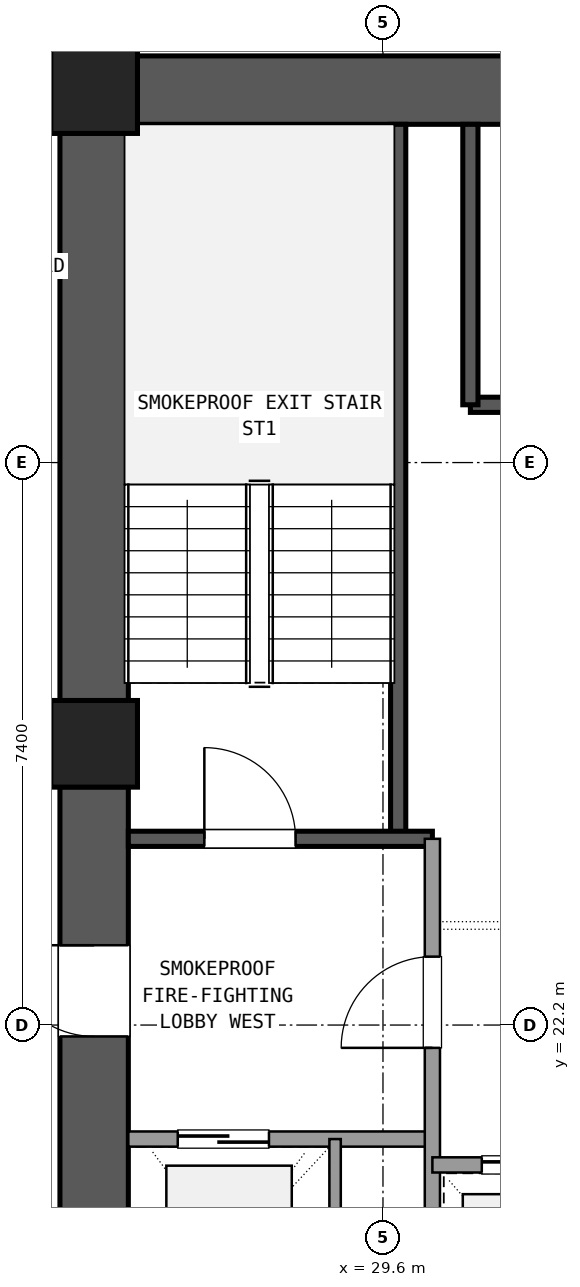
"""IFC4 building model, lengths in metres.
Left out: names, types, materials, properties, quantities, classifications, styles, units other than length and angle.
Written with IfcOpenShell. Run it as: python <this file> out.ifc"""

import sys

from ifc_helpers import new_model, si_unit, direction, frame, frame_2d, origin, origin_2d, place, context, subcontext, project, spatial, rectangle, extrude, element, fill, save


model = new_model("IFC4")
c1 = context("Model", 3, precision=1e-05, world=origin(), true_north=direction((0.0, 1.0)))
c2 = subcontext(c1, "Body", "Model", "MODEL_VIEW")
j1 = project(units=[si_unit("LENGTHUNIT", "METRE"), si_unit("PLANEANGLEUNIT", "RADIAN")], contexts=[c1])
p1 = place(None, origin())
s1 = spatial("IfcSite", under=j1, at=p1, CompositionType="ELEMENT")
p2 = place(p1, origin())
s2 = spatial("IfcBuilding", under=s1, at=p2, CompositionType="ELEMENT")
p3 = place(p2, frame((0.0, 0.0, 41.94)))
s3 = spatial("IfcBuildingStorey", under=s2, at=p3, CompositionType="ELEMENT", Elevation=41.94)
for number, where, z_axis, x_axis in (
    (1, (25.8, 34.5, 0.0), (0.0, 0.0, 1.0), (1.0, 0.0, 0.0)),
    (2, (25.8, 25.9, 0.0), (0.0, 0.0, 1.0), (1.0, 0.0, 0.0)),
):
    element("IfcColumn", number, at=place(p3, frame(where, z_axis=z_axis, x_axis=x_axis)), inside=s3, PredefinedType="COLUMN", context=c2, shape_type="SweptSolid", body=[
        extrude(rectangle(XDim=1.14, YDim=1.14, at=origin_2d()), origin(), (0.0, 0.0, 1.0), 3.6),
    ])
p4 = place(p3, frame((36.435, 34.5, 0.0), z_axis=(0.0, 0.0, 1.0), x_axis=(-1.0, 0.0, 0.0)))
e3 = element("IfcWall", 3, at=p4, inside=s3, PredefinedType="SHEAR", context=c2, shape_type="SweptSolid", body=[
    extrude(rectangle(XDim=10.07, YDim=0.9, at=frame_2d((5.035, 0.0))), origin(), (0.0, 0.0, 1.0), 3.32),
])
p5 = place(p4, frame((4.035, 0.0, 0.0)))
e4 = element("IfcOpeningElement", 4, at=p5, cuts=e3, PredefinedType="OPENING", context=c2, shape_type="SweptSolid", body=[
    extrude(rectangle(XDim=1.2, YDim=2.15, at=frame_2d((0.6, 1.075))), frame((0.0, 0.46, 0.0), z_axis=(0.0, -1.0, 0.0), x_axis=(1.0, 0.0, 0.0)), (0.0, 0.0, 1.0), 0.92),
])
p6 = place(p3, frame((25.8, 33.935, 0.0), z_axis=(0.0, 0.0, 1.0), x_axis=(0.0, -1.0, 0.0)))
e5 = element("IfcWall", 5, at=p6, inside=s3, PredefinedType="SHEAR", context=c2, shape_type="SweptSolid", body=[
    extrude(rectangle(XDim=7.47, YDim=0.9, at=frame_2d((3.735, 0.0))), origin(), (0.0, 0.0, 1.0), 3.32),
])
p7 = place(p3, frame((25.8, 25.335, 0.0), z_axis=(0.0, 0.0, 1.0), x_axis=(0.0, -1.0, 0.0)))
e6 = element("IfcWall", 6, at=p7, inside=s3, PredefinedType="SHEAR", context=c2, shape_type="SweptSolid", body=[
    extrude(rectangle(XDim=7.47, YDim=0.9, at=frame_2d((3.735, 0.0))), origin(), (0.0, 0.0, 1.0), 3.32),
])
p8 = place(p7, frame((2.085, 0.0, 0.0)))
e7 = element("IfcOpeningElement", 7, at=p8, cuts=e6, PredefinedType="OPENING", context=c2, shape_type="SweptSolid", body=[
    extrude(rectangle(XDim=1.2, YDim=2.15, at=frame_2d((0.6, 1.075))), frame((0.0, 0.46, 0.0), z_axis=(0.0, -1.0, 0.0), x_axis=(1.0, 0.0, 0.0)), (0.0, 0.0, 1.0), 0.92),
])
p9 = place(p3, frame((29.8, 24.65, 0.0), z_axis=(0.0, 0.0, 1.0), x_axis=(0.0, 1.0, 0.0)))
e8 = element("IfcWall", 8, at=p9, inside=s3, PredefinedType="SHEAR", context=c2, shape_type="SweptSolid", body=[
    extrude(rectangle(XDim=9.4, YDim=0.2, at=frame_2d((4.7, 0.0))), origin(), (0.0, 0.0, 1.0), 3.32),
])
p10 = place(p3, frame((26.25, 24.65, 0.0), z_axis=(0.0, 0.0, 1.0), x_axis=(1.0, 0.0, 0.0)))
e9 = element("IfcWall", 9, at=p10, inside=s3, PredefinedType="SHEAR", context=c2, shape_type="SweptSolid", body=[
    extrude(rectangle(XDim=4.0, YDim=0.2, at=frame_2d((2.0, 0.0))), origin(), (0.0, 0.0, 1.0), 3.32),
])
p11 = place(p10, frame((1.0, 0.0, 0.0)))
e10 = element("IfcOpeningElement", 10, at=p11, cuts=e9, PredefinedType="OPENING", context=c2, shape_type="SweptSolid", body=[
    extrude(rectangle(XDim=1.2, YDim=2.15, at=frame_2d((0.6, 1.075))), frame((0.0, 0.11, 0.0), z_axis=(0.0, -1.0, 0.0), x_axis=(1.0, 0.0, 0.0)), (0.0, 0.0, 1.0), 0.22),
])
p12 = place(p3, frame((30.75, 30.36, 0.0), z_axis=(0.0, 0.0, 1.0), x_axis=(1.0, 0.0, 0.0)))
e11 = element("IfcWall", 11, at=p12, inside=s3, PredefinedType="SHEAR", context=c2, shape_type="SweptSolid", body=[
    extrude(rectangle(XDim=9.5, YDim=0.2, at=frame_2d((4.75, 0.0))), origin(), (0.0, 0.0, 1.0), 3.32),
])
p13 = place(p3, frame((30.75, 30.36, 0.0), z_axis=(0.0, 0.0, 1.0), x_axis=(0.0, 1.0, 0.0)))
e12 = element("IfcWall", 12, at=p13, inside=s3, PredefinedType="SHEAR", context=c2, shape_type="SweptSolid", body=[
    extrude(rectangle(XDim=3.69, YDim=0.2, at=frame_2d((1.845, 0.0))), origin(), (0.0, 0.0, 1.0), 3.32),
])
p14 = place(p3, frame((26.25, 20.7, 0.0), z_axis=(0.0, 0.0, 1.0), x_axis=(1.0, 0.0, 0.0)))
e13 = element("IfcWall", 13, at=p14, inside=s3, PredefinedType="SOLIDWALL", context=c2, shape_type="SweptSolid", body=[
    extrude(rectangle(XDim=4.0, YDim=0.2, at=frame_2d((2.0, 0.0))), origin(), (0.0, 0.0, 1.0), 2.61),
])
p15 = place(p14, frame((0.65, 0.0, 0.0)))
e14 = element("IfcOpeningElement", 14, at=p15, cuts=e13, PredefinedType="OPENING", context=c2, shape_type="SweptSolid", body=[
    extrude(rectangle(XDim=1.2, YDim=2.15, at=frame_2d((0.6, 1.075))), frame((0.0, 0.11, 0.0), z_axis=(0.0, -1.0, 0.0), x_axis=(1.0, 0.0, 0.0)), (0.0, 0.0, 1.0), 0.22),
])
p16 = place(p3, frame((30.25, 17.75, 0.0), z_axis=(0.0, 0.0, 1.0), x_axis=(0.0, 1.0, 0.0)))
e15 = element("IfcWall", 15, at=p16, inside=s3, PredefinedType="SOLIDWALL", context=c2, shape_type="SweptSolid", body=[
    extrude(rectangle(XDim=6.9, YDim=0.2, at=frame_2d((3.45, 0.0))), origin(), (0.0, 0.0, 1.0), 2.61),
])
p17 = place(p16, frame((4.15, 0.0, 0.0)))
e16 = element("IfcOpeningElement", 16, at=p17, cuts=e15, PredefinedType="OPENING", context=c2, shape_type="SweptSolid", body=[
    extrude(rectangle(XDim=1.2, YDim=2.15, at=frame_2d((0.6, 1.075))), frame((0.0, 0.11, 0.0), z_axis=(0.0, -1.0, 0.0), x_axis=(1.0, 0.0, 0.0)), (0.0, 0.0, 1.0), 0.22),
])
p18 = place(p3, frame((28.97, 17.75, 0.0), z_axis=(0.0, 0.0, 1.0), x_axis=(0.0, 1.0, 0.0)))
e17 = element("IfcWall", 17, at=p18, inside=s3, PredefinedType="PARTITIONING", context=c2, shape_type="SweptSolid", body=[
    extrude(rectangle(XDim=2.95, YDim=0.15, at=frame_2d((1.475, 0.0))), origin(), (0.0, 0.0, 1.0), 2.61),
])
p19 = place(p3, frame((30.25, 20.36, 0.0), z_axis=(0.0, 0.0, 1.0), x_axis=(1.0, 0.0, 0.0)))
e18 = element("IfcWall", 18, at=p19, inside=s3, PredefinedType="SOLIDWALL", context=c2, shape_type="SweptSolid", body=[
    extrude(rectangle(XDim=7.0, YDim=0.2, at=frame_2d((3.5, 0.0))), origin(), (0.0, 0.0, 1.0), 2.61),
])
p20 = place(p19, frame((0.65, 0.0, 0.0)))
e19 = element("IfcOpeningElement", 19, at=p20, cuts=e18, PredefinedType="OPENING", context=c2, shape_type="SweptSolid", body=[
    extrude(rectangle(XDim=1.1, YDim=2.15, at=frame_2d((0.55, 1.075))), frame((0.0, 0.11, 0.0), z_axis=(0.0, -1.0, 0.0), x_axis=(1.0, 0.0, 0.0)), (0.0, 0.0, 1.0), 0.22),
])
p21 = place(p19, frame((2.95, 0.0, 0.0)))
e20 = element("IfcOpeningElement", 20, at=p21, cuts=e18, PredefinedType="OPENING", context=c2, shape_type="SweptSolid", body=[
    extrude(rectangle(XDim=1.1, YDim=2.15, at=frame_2d((0.55, 1.075))), frame((0.0, 0.11, 0.0), z_axis=(0.0, -1.0, 0.0), x_axis=(1.0, 0.0, 0.0)), (0.0, 0.0, 1.0), 0.22),
])
p22 = place(p19, frame((5.25, 0.0, 0.0)))
e21 = element("IfcOpeningElement", 21, at=p22, cuts=e18, PredefinedType="OPENING", context=c2, shape_type="SweptSolid", body=[
    extrude(rectangle(XDim=1.1, YDim=2.15, at=frame_2d((0.55, 1.075))), frame((0.0, 0.11, 0.0), z_axis=(0.0, -1.0, 0.0), x_axis=(1.0, 0.0, 0.0)), (0.0, 0.0, 1.0), 0.22),
])
p23 = place(p11, origin())
e22 = element("IfcDoor", 22, at=p23, inside=s3, OperationType="SINGLE_SWING_LEFT", PredefinedType="DOOR", context=c2, shape_type="SweptSolid", body=[
    extrude(rectangle(XDim=1.2, YDim=2.15, at=frame_2d((0.6, 1.075))), frame((0.0, 0.025, 0.0), z_axis=(0.0, -1.0, 0.0), x_axis=(1.0, 0.0, 0.0)), (0.0, 0.0, 1.0), 0.05),
])
fill(e10, e22)
p24 = place(p15, origin())
e23 = element("IfcDoor", 23, at=p24, inside=s3, OperationType="SLIDING_TO_LEFT", PredefinedType="DOOR", context=c2, shape_type="SweptSolid", body=[
    extrude(rectangle(XDim=1.2, YDim=2.15, at=frame_2d((0.6, 1.075))), frame((0.0, 0.025, 0.0), z_axis=(0.0, -1.0, 0.0), x_axis=(1.0, 0.0, 0.0)), (0.0, 0.0, 1.0), 0.05),
])
fill(e14, e23)
p25 = place(p17, origin())
e24 = element("IfcDoor", 24, at=p25, inside=s3, OperationType="SINGLE_SWING_LEFT", PredefinedType="DOOR", context=c2, shape_type="SweptSolid", body=[
    extrude(rectangle(XDim=1.2, YDim=2.15, at=frame_2d((0.6, 1.075))), frame((0.0, 0.025, 0.0), z_axis=(0.0, -1.0, 0.0), x_axis=(1.0, 0.0, 0.0)), (0.0, 0.0, 1.0), 0.05),
])
fill(e16, e24)
p26 = place(p8, frame((1.2, 0.0, 0.0), z_axis=(0.0, 0.0, 1.0), x_axis=(-1.0, 0.0, 0.0)))
e25 = element("IfcDoor", 25, at=p26, inside=s3, OperationType="SINGLE_SWING_LEFT", PredefinedType="DOOR", context=c2, shape_type="SweptSolid", body=[
    extrude(rectangle(XDim=1.2, YDim=2.15, at=frame_2d((0.6, 1.075))), frame((0.0, 0.025, 0.0), z_axis=(0.0, -1.0, 0.0), x_axis=(1.0, 0.0, 0.0)), (0.0, 0.0, 1.0), 0.05),
])
fill(e7, e25)
p27 = place(p20, origin())
e26 = element("IfcDoor", 26, at=p27, inside=s3, OperationType="SLIDING_TO_LEFT", PredefinedType="DOOR", context=c2, shape_type="SweptSolid", body=[
    extrude(rectangle(XDim=1.1, YDim=2.15, at=frame_2d((0.55, 1.075))), frame((0.0, 0.025, 0.0), z_axis=(0.0, -1.0, 0.0), x_axis=(1.0, 0.0, 0.0)), (0.0, 0.0, 1.0), 0.05),
])
fill(e19, e26)
save(model, sys.argv[1])
